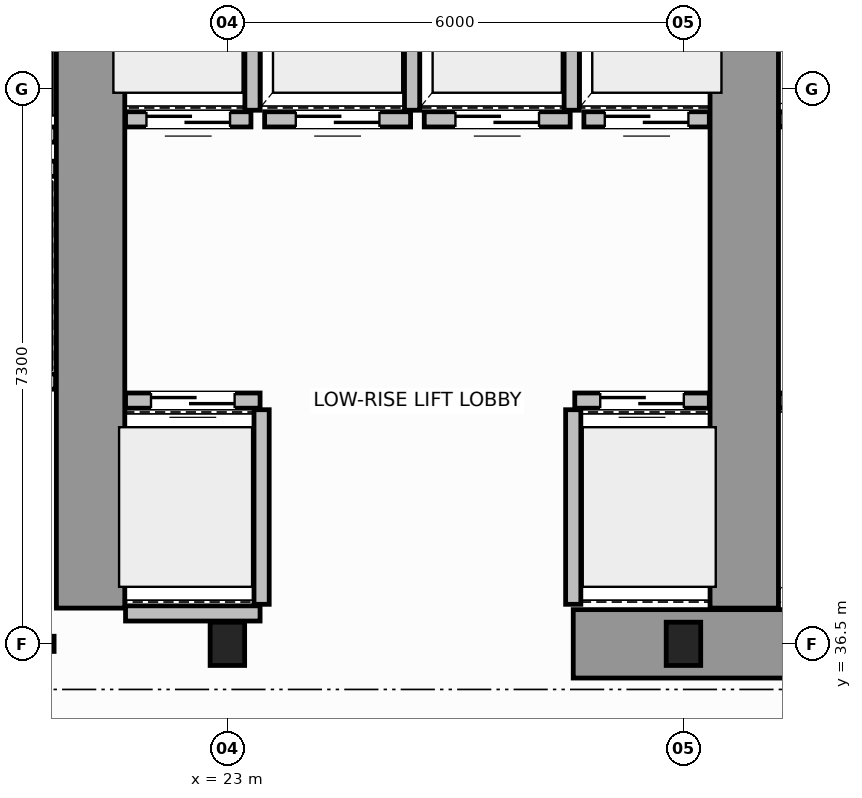
"""IFC4 building model, lengths in metres.
Left out: names, types, materials, properties, quantities, classifications, styles, units other than length and angle.
Written with IfcOpenShell. Run it as: python <this file> out.ifc"""

import sys

from ifc_helpers import new_model, si_unit, direction, frame, frame_2d, origin, origin_2d, place, context, subcontext, project, spatial, rectangle, i_section, extrude, source, transform, mapped, element, fill, save


model = new_model("IFC4")
c1 = context("Model", 3, precision=1e-05, world=origin(), true_north=direction((0.0, 1.0)))
c2 = subcontext(c1, "Body", "Model", "MODEL_VIEW")
j1 = project(units=[si_unit("LENGTHUNIT", "METRE"), si_unit("PLANEANGLEUNIT", "RADIAN")], contexts=[c1])
p1 = place(None, origin())
s1 = spatial("IfcSite", under=j1, at=p1, CompositionType="ELEMENT")
p2 = place(p1, origin())
s2 = spatial("IfcBuilding", under=s1, at=p2, CompositionType="ELEMENT")
p3 = place(p2, frame((0.0, 0.0, 60.6)))
s3 = spatial("IfcBuildingStorey", under=s2, at=p3, CompositionType="ELEMENT", Elevation=60.6)
m1 = source(origin(), c2, "Body", "SweptSolid", [
    extrude(i_section(OverallWidth=0.454, OverallDepth=0.569, WebThickness=0.078, FlangeThickness=0.08, FilletRadius=0.015, at=origin_2d()), origin(), (0.0, 0.0, 1.0), 3.8),
])
for number, where, z_axis, x_axis in (
    (1, (23.0, 36.5, 0.0), (0.0, 0.0, 1.0), (1.0, 0.0, 0.0)),
    (2, (29.0, 36.5, 0.0), (0.0, 0.0, 1.0), (1.0, 0.0, 0.0)),
):
    element("IfcColumn", number, at=place(p3, frame(where, z_axis=z_axis, x_axis=x_axis)), inside=s3, PredefinedType="COLUMN", context=c2, shape_type="MappedRepresentation", body=[
        mapped(m1, transform((0.0, 0.0, 0.0), scale=1.0)),
    ])
p4 = place(p3, frame((27.55, 36.5, 0.0), z_axis=(0.0, 0.0, 1.0), x_axis=(1.0, 0.0, 0.0)))
e3 = element("IfcWall", 3, at=p4, inside=s3, PredefinedType="SHEAR", context=c2, shape_type="SweptSolid", body=[
    extrude(rectangle(XDim=4.5, YDim=0.9, at=frame_2d((2.25, 0.0))), origin(), (0.0, 0.0, 1.0), 3.8),
])
for number, where, z_axis, x_axis in (
    (4, (21.2, 36.97, 0.0), (0.0, 0.0, 1.0), (0.0, 1.0, 0.0)),
    (5, (29.8, 36.97, 0.0), (0.0, 0.0, 1.0), (0.0, 1.0, 0.0)),
):
    element("IfcWall", number, at=place(p3, frame(where, z_axis=z_axis, x_axis=x_axis)), inside=s3, PredefinedType="SHEAR", context=c2, shape_type="SweptSolid", body=[
        extrude(rectangle(XDim=9.23, YDim=0.9, at=frame_2d((4.615, 0.0))), origin(), (0.0, 0.0, 1.0), 3.8),
    ])
p5 = place(p3, frame((18.25, 36.5, 0.0), z_axis=(0.0, 0.0, 1.0), x_axis=(1.0, 0.0, 0.0)))
e6 = element("IfcWall", 6, at=p5, inside=s3, PredefinedType="SOLIDWALL", context=c2, shape_type="SweptSolid", body=[
    extrude(rectangle(XDim=2.47, YDim=0.2, at=frame_2d((1.235, 0.0))), origin(), (0.0, 0.0, 1.0), 2.37),
])
p6 = place(p5, frame((0.65, 0.0, 0.0)))
e7 = element("IfcOpeningElement", 7, at=p6, cuts=e6, PredefinedType="OPENING", context=c2, shape_type="SweptSolid", body=[
    extrude(rectangle(XDim=1.1, YDim=2.15, at=frame_2d((0.55, 1.075))), frame((0.0, 0.11, 0.0), z_axis=(0.0, -1.0, 0.0), x_axis=(1.0, 0.0, 0.0)), (0.0, 0.0, 1.0), 0.22),
])
p7 = place(p3, frame((21.66, 39.7, 0.0), z_axis=(0.0, 0.0, 1.0), x_axis=(1.0, 0.0, 0.0)))
e8 = element("IfcWall", 8, at=p7, inside=s3, PredefinedType="SOLIDWALL", context=c2, shape_type="SweptSolid", body=[
    extrude(rectangle(XDim=1.77, YDim=0.2, at=frame_2d((0.885, 0.0))), origin(), (0.0, 0.0, 1.0), 3.58),
])
p8 = place(p7, frame((0.335, 0.0, 0.0)))
e9 = element("IfcOpeningElement", 9, at=p8, cuts=e8, PredefinedType="OPENING", context=c2, shape_type="SweptSolid", body=[
    extrude(rectangle(XDim=1.1, YDim=2.15, at=frame_2d((0.55, 1.075))), frame((0.0, 0.11, 0.0), z_axis=(0.0, -1.0, 0.0), x_axis=(1.0, 0.0, 0.0)), (0.0, 0.0, 1.0), 0.22),
])
p9 = place(p3, frame((21.66, 36.9, 0.0), z_axis=(0.0, 0.0, 1.0), x_axis=(1.0, 0.0, 0.0)))
e10 = element("IfcWall", 10, at=p9, inside=s3, PredefinedType="SOLIDWALL", context=c2, shape_type="SweptSolid", body=[
    extrude(rectangle(XDim=1.77, YDim=0.2, at=frame_2d((0.885, 0.0))), origin(), (0.0, 0.0, 1.0), 2.37),
])
p10 = place(p3, frame((23.45, 37.02, 0.0), z_axis=(0.0, 0.0, 1.0), x_axis=(0.0, 1.0, 0.0)))
e11 = element("IfcWall", 11, at=p10, inside=s3, PredefinedType="SOLIDWALL", context=c2, shape_type="SweptSolid", body=[
    extrude(rectangle(XDim=2.56, YDim=0.2, at=frame_2d((1.28, 0.0))), origin(), (0.0, 0.0, 1.0), 3.58),
])
p11 = place(p3, frame((27.57, 39.7, 0.0), z_axis=(0.0, 0.0, 1.0), x_axis=(1.0, 0.0, 0.0)))
e12 = element("IfcWall", 12, at=p11, inside=s3, PredefinedType="SOLIDWALL", context=c2, shape_type="SweptSolid", body=[
    extrude(rectangle(XDim=1.77, YDim=0.2, at=frame_2d((0.885, 0.0))), origin(), (0.0, 0.0, 1.0), 3.58),
])
p12 = place(p11, frame((0.335, 0.0, 0.0)))
e13 = element("IfcOpeningElement", 13, at=p12, cuts=e12, PredefinedType="OPENING", context=c2, shape_type="SweptSolid", body=[
    extrude(rectangle(XDim=1.1, YDim=2.15, at=frame_2d((0.55, 1.075))), frame((0.0, 0.11, 0.0), z_axis=(0.0, -1.0, 0.0), x_axis=(1.0, 0.0, 0.0)), (0.0, 0.0, 1.0), 0.22),
])
p13 = place(p3, frame((27.55, 37.02, 0.0), z_axis=(0.0, 0.0, 1.0), x_axis=(0.0, 1.0, 0.0)))
e14 = element("IfcWall", 14, at=p13, inside=s3, PredefinedType="SOLIDWALL", context=c2, shape_type="SweptSolid", body=[
    extrude(rectangle(XDim=2.56, YDim=0.2, at=frame_2d((1.28, 0.0))), origin(), (0.0, 0.0, 1.0), 3.58),
])
p14 = place(p3, frame((21.66, 43.4, 0.0), z_axis=(0.0, 0.0, 1.0), x_axis=(1.0, 0.0, 0.0)))
e15 = element("IfcWall", 15, at=p14, inside=s3, PredefinedType="SOLIDWALL", context=c2, shape_type="SweptSolid", body=[
    extrude(rectangle(XDim=1.65, YDim=0.2, at=frame_2d((0.825, 0.0))), origin(), (0.0, 0.0, 1.0), 3.58),
])
p15 = place(p14, frame((0.275, 0.0, 0.0)))
e16 = element("IfcOpeningElement", 16, at=p15, cuts=e15, PredefinedType="OPENING", context=c2, shape_type="SweptSolid", body=[
    extrude(rectangle(XDim=1.1, YDim=2.15, at=frame_2d((0.55, 1.075))), frame((0.0, 0.11, 0.0), z_axis=(0.0, -1.0, 0.0), x_axis=(1.0, 0.0, 0.0)), (0.0, 0.0, 1.0), 0.22),
])
p16 = place(p3, frame((23.33, 43.52, 0.0), z_axis=(0.0, 0.0, 1.0), x_axis=(0.0, 1.0, 0.0)))
e17 = element("IfcWall", 17, at=p16, inside=s3, PredefinedType="SOLIDWALL", context=c2, shape_type="SweptSolid", body=[
    extrude(rectangle(XDim=2.56, YDim=0.2, at=frame_2d((1.28, 0.0))), origin(), (0.0, 0.0, 1.0), 3.58),
])
p17 = place(p3, frame((23.49, 43.4, 0.0), z_axis=(0.0, 0.0, 1.0), x_axis=(1.0, 0.0, 0.0)))
e18 = element("IfcWall", 18, at=p17, inside=s3, PredefinedType="SOLIDWALL", context=c2, shape_type="SweptSolid", body=[
    extrude(rectangle(XDim=1.92, YDim=0.2, at=frame_2d((0.96, 0.0))), origin(), (0.0, 0.0, 1.0), 3.58),
])
p18 = place(p17, frame((0.41, 0.0, 0.0)))
e19 = element("IfcOpeningElement", 19, at=p18, cuts=e18, PredefinedType="OPENING", context=c2, shape_type="SweptSolid", body=[
    extrude(rectangle(XDim=1.1, YDim=2.15, at=frame_2d((0.55, 1.075))), frame((0.0, 0.11, 0.0), z_axis=(0.0, -1.0, 0.0), x_axis=(1.0, 0.0, 0.0)), (0.0, 0.0, 1.0), 0.22),
])
p19 = place(p3, frame((25.43, 43.52, 0.0), z_axis=(0.0, 0.0, 1.0), x_axis=(0.0, 1.0, 0.0)))
e20 = element("IfcWall", 20, at=p19, inside=s3, PredefinedType="SOLIDWALL", context=c2, shape_type="SweptSolid", body=[
    extrude(rectangle(XDim=2.56, YDim=0.2, at=frame_2d((1.28, 0.0))), origin(), (0.0, 0.0, 1.0), 3.58),
])
p20 = place(p3, frame((25.59, 43.4, 0.0), z_axis=(0.0, 0.0, 1.0), x_axis=(1.0, 0.0, 0.0)))
e21 = element("IfcWall", 21, at=p20, inside=s3, PredefinedType="SOLIDWALL", context=c2, shape_type="SweptSolid", body=[
    extrude(rectangle(XDim=1.92, YDim=0.2, at=frame_2d((0.96, 0.0))), origin(), (0.0, 0.0, 1.0), 3.58),
])
p21 = place(p20, frame((0.41, 0.0, 0.0)))
e22 = element("IfcOpeningElement", 22, at=p21, cuts=e21, PredefinedType="OPENING", context=c2, shape_type="SweptSolid", body=[
    extrude(rectangle(XDim=1.1, YDim=2.15, at=frame_2d((0.55, 1.075))), frame((0.0, 0.11, 0.0), z_axis=(0.0, -1.0, 0.0), x_axis=(1.0, 0.0, 0.0)), (0.0, 0.0, 1.0), 0.22),
])
p22 = place(p3, frame((27.53, 43.52, 0.0), z_axis=(0.0, 0.0, 1.0), x_axis=(0.0, 1.0, 0.0)))
e23 = element("IfcWall", 23, at=p22, inside=s3, PredefinedType="SOLIDWALL", context=c2, shape_type="SweptSolid", body=[
    extrude(rectangle(XDim=2.56, YDim=0.2, at=frame_2d((1.28, 0.0))), origin(), (0.0, 0.0, 1.0), 3.58),
])
p23 = place(p3, frame((27.69, 43.4, 0.0), z_axis=(0.0, 0.0, 1.0), x_axis=(1.0, 0.0, 0.0)))
e24 = element("IfcWall", 24, at=p23, inside=s3, PredefinedType="SOLIDWALL", context=c2, shape_type="SweptSolid", body=[
    extrude(rectangle(XDim=1.65, YDim=0.2, at=frame_2d((0.825, 0.0))), origin(), (0.0, 0.0, 1.0), 3.58),
])
p24 = place(p23, frame((0.275, 0.0, 0.0)))
e25 = element("IfcOpeningElement", 25, at=p24, cuts=e24, PredefinedType="OPENING", context=c2, shape_type="SweptSolid", body=[
    extrude(rectangle(XDim=1.1, YDim=2.15, at=frame_2d((0.55, 1.075))), frame((0.0, 0.11, 0.0), z_axis=(0.0, -1.0, 0.0), x_axis=(1.0, 0.0, 0.0)), (0.0, 0.0, 1.0), 0.22),
])
p25 = place(p3, frame((30.26, 39.7, 0.0), z_axis=(0.0, 0.0, 1.0), x_axis=(1.0, 0.0, 0.0)))
e26 = element("IfcWall", 26, at=p25, inside=s3, PredefinedType="SOLIDWALL", context=c2, shape_type="SweptSolid", body=[
    extrude(rectangle(XDim=1.77, YDim=0.2, at=frame_2d((0.885, 0.0))), origin(), (0.0, 0.0, 1.0), 3.58),
])
p26 = place(p3, frame((30.26, 43.4, 0.0), z_axis=(0.0, 0.0, 1.0), x_axis=(1.0, 0.0, 0.0)))
e27 = element("IfcWall", 27, at=p26, inside=s3, PredefinedType="SOLIDWALL", context=c2, shape_type="SweptSolid", body=[
    extrude(rectangle(XDim=1.65, YDim=0.2, at=frame_2d((0.825, 0.0))), origin(), (0.0, 0.0, 1.0), 3.58),
])
p27 = place(p3, frame((18.67, 43.2, 0.0), z_axis=(0.0, 0.0, 1.0), x_axis=(1.0, 0.0, 0.0)))
e28 = element("IfcWall", 28, at=p27, inside=s3, PredefinedType="SOLIDWALL", context=c2, shape_type="SweptSolid", body=[
    extrude(rectangle(XDim=2.07, YDim=0.2, at=frame_2d((1.035, 0.0))), origin(), (0.0, 0.0, 1.0), 3.58),
])
p28 = place(p3, frame((18.67, 39.95, 0.0), z_axis=(0.0, 0.0, 1.0), x_axis=(1.0, 0.0, 0.0)))
e29 = element("IfcWall", 29, at=p28, inside=s3, PredefinedType="SOLIDWALL", context=c2, shape_type="SweptSolid", body=[
    extrude(rectangle(XDim=2.07, YDim=0.2, at=frame_2d((1.035, 0.0))), origin(), (0.0, 0.0, 1.0), 3.58),
])
p29 = place(p28, frame((0.485, 0.0, 0.0)))
e30 = element("IfcOpeningElement", 30, at=p29, cuts=e29, PredefinedType="OPENING", context=c2, shape_type="SweptSolid", body=[
    extrude(rectangle(XDim=1.1, YDim=2.15, at=frame_2d((0.55, 1.075))), frame((0.0, 0.11, 0.0), z_axis=(0.0, -1.0, 0.0), x_axis=(1.0, 0.0, 0.0)), (0.0, 0.0, 1.0), 0.22),
])
p30 = place(p3, frame((18.67, 42.75, 0.0), z_axis=(0.0, 0.0, 1.0), x_axis=(1.0, 0.0, 0.0)))
e31 = element("IfcWall", 31, at=p30, inside=s3, PredefinedType="SOLIDWALL", context=c2, shape_type="SweptSolid", body=[
    extrude(rectangle(XDim=2.07, YDim=0.2, at=frame_2d((1.035, 0.0))), origin(), (0.0, 0.0, 1.0), 3.58),
])
m2 = source(origin(), c2, "Body", "SweptSolid", [
    extrude(rectangle(XDim=1.1, YDim=2.15, at=frame_2d((0.55, 1.075))), frame((0.0, 0.025, 0.0), z_axis=(0.0, -1.0, 0.0), x_axis=(1.0, 0.0, 0.0)), (0.0, 0.0, 1.0), 0.05),
])
p31 = place(p8, origin())
e32 = element("IfcDoor", 32, at=p31, inside=s3, OperationType="DOUBLE_DOOR_SLIDING", PredefinedType="DOOR", context=c2, shape_type="MappedRepresentation", body=[
    mapped(m2, transform((0.0, 0.0, 0.0), scale=1.0)),
])
fill(e9, e32)
p32 = place(p12, origin())
e33 = element("IfcDoor", 33, at=p32, inside=s3, OperationType="DOUBLE_DOOR_SLIDING", PredefinedType="DOOR", context=c2, shape_type="MappedRepresentation", body=[
    mapped(m2, transform((0.0, 0.0, 0.0), scale=1.0)),
])
fill(e13, e33)
p33 = place(p15, origin())
e34 = element("IfcDoor", 34, at=p33, inside=s3, OperationType="DOUBLE_DOOR_SLIDING", PredefinedType="DOOR", context=c2, shape_type="MappedRepresentation", body=[
    mapped(m2, transform((0.0, 0.0, 0.0), scale=1.0)),
])
fill(e16, e34)
p34 = place(p18, origin())
e35 = element("IfcDoor", 35, at=p34, inside=s3, OperationType="DOUBLE_DOOR_SLIDING", PredefinedType="DOOR", context=c2, shape_type="MappedRepresentation", body=[
    mapped(m2, transform((0.0, 0.0, 0.0), scale=1.0)),
])
fill(e19, e35)
p35 = place(p21, origin())
e36 = element("IfcDoor", 36, at=p35, inside=s3, OperationType="DOUBLE_DOOR_SLIDING", PredefinedType="DOOR", context=c2, shape_type="MappedRepresentation", body=[
    mapped(m2, transform((0.0, 0.0, 0.0), scale=1.0)),
])
fill(e22, e36)
p36 = place(p24, origin())
e37 = element("IfcDoor", 37, at=p36, inside=s3, OperationType="DOUBLE_DOOR_SLIDING", PredefinedType="DOOR", context=c2, shape_type="MappedRepresentation", body=[
    mapped(m2, transform((0.0, 0.0, 0.0), scale=1.0)),
])
fill(e25, e37)
save(model, sys.argv[1])
